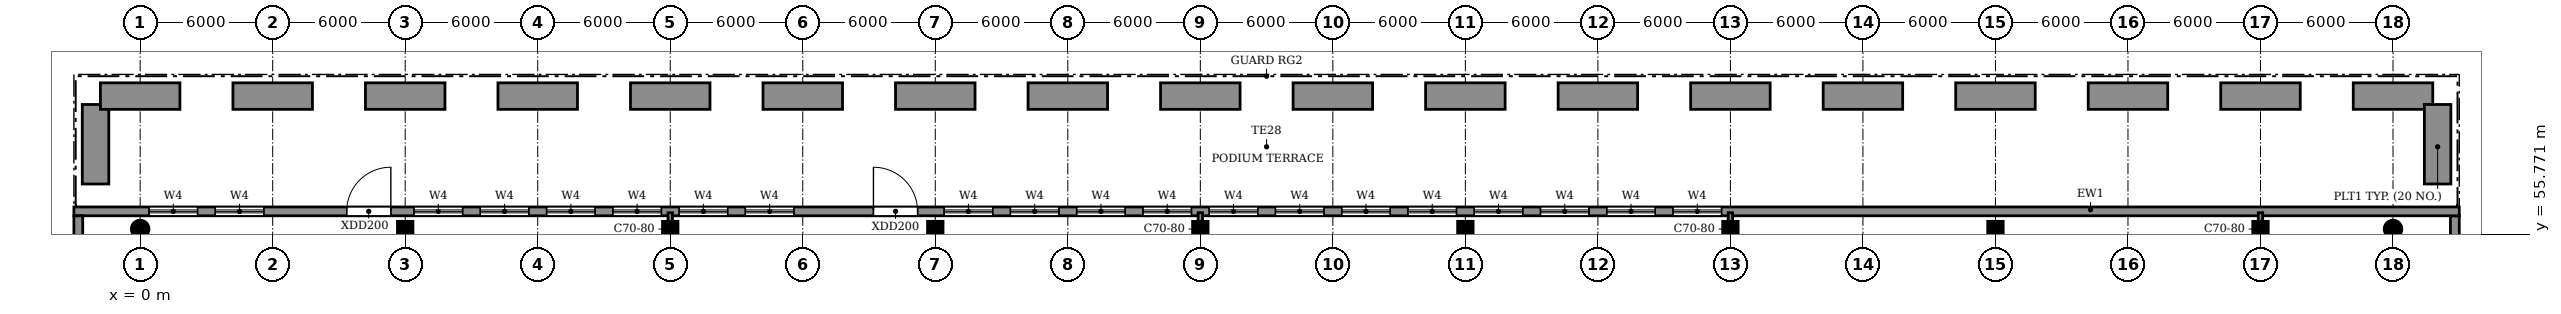
"""IFC4 building model, lengths in metres.
Left out: names, types, materials, properties, quantities, classifications, styles, units other than length and angle.
Written with IfcOpenShell. Run it as: python <this file> out.ifc"""

import sys

from ifc_helpers import new_model, si_unit, direction, frame, frame_2d, origin, origin_2d, place, context, subcontext, project, spatial, polyline, rectangle, circle, outline, extrude, source, transform, mapped, element, fill, save


model = new_model("IFC4")
c1 = context("Model", 3, precision=1e-05, world=origin(), true_north=direction((0.0, 1.0)))
c2 = subcontext(c1, "Body", "Model", "MODEL_VIEW")
j1 = project(units=[si_unit("LENGTHUNIT", "METRE"), si_unit("PLANEANGLEUNIT", "RADIAN")], contexts=[c1])
p1 = place(None, origin())
s1 = spatial("IfcSite", under=j1, at=p1, CompositionType="ELEMENT")
p2 = place(p1, origin())
s2 = spatial("IfcBuilding", under=s1, at=p2, CompositionType="ELEMENT")
p3 = place(p2, frame((0.0, 0.0, 15.0)))
s3 = spatial("IfcBuildingStorey", under=s2, at=p3, CompositionType="ELEMENT", Elevation=15.0)
m1 = source(origin(), c2, "Body", "SweptSolid", [
    extrude(circle(Radius=0.4, at=origin_2d()), origin(), (0.0, 0.0, 1.0), 3.92),
])
p4 = place(p3, frame((0.0, 56.0, 0.0), z_axis=(0.0, 0.0, 1.0), x_axis=(1.0, 0.0, 0.0)))
e1 = element("IfcColumn", 1, at=p4, inside=s3, PredefinedType="COLUMN", context=c2, shape_type="MappedRepresentation", body=[
    mapped(m1, transform((0.0, 0.0, 0.0))),
])
m2 = source(origin(), c2, "Body", "SweptSolid", [
    extrude(rectangle(XDim=0.7, YDim=0.7, at=origin_2d()), origin(), (0.0, 0.0, 1.0), 3.92),
])
for number, where, z_axis, x_axis in (
    (2, (12.0, 56.0, 0.0), (0.0, 0.0, 1.0), (1.0, 0.0, 0.0)),
    (3, (24.0, 56.0, 0.0), (0.0, 0.0, 1.0), (1.0, 0.0, 0.0)),
    (4, (36.0, 56.0, 0.0), (0.0, 0.0, 1.0), (1.0, 0.0, 0.0)),
    (5, (48.0, 56.0, 0.0), (0.0, 0.0, 1.0), (1.0, 0.0, 0.0)),
    (6, (60.0, 56.0, 0.0), (0.0, 0.0, 1.0), (1.0, 0.0, 0.0)),
    (7, (72.0, 56.0, 0.0), (0.0, 0.0, 1.0), (1.0, 0.0, 0.0)),
    (8, (84.0, 56.0, 0.0), (0.0, 0.0, 1.0), (1.0, 0.0, 0.0)),
    (9, (96.0, 56.0, 0.0), (0.0, 0.0, 1.0), (1.0, 0.0, 0.0)),
):
    element("IfcColumn", number, at=place(p3, frame(where, z_axis=z_axis, x_axis=x_axis)), inside=s3, PredefinedType="COLUMN", context=c2, shape_type="MappedRepresentation", body=[
        mapped(m2, transform((0.0, 0.0, 0.0))),
    ])
p5 = place(p3, frame((102.0, 56.0, 0.0), z_axis=(0.0, 0.0, 1.0), x_axis=(1.0, 0.0, 0.0)))
e10 = element("IfcColumn", 10, at=p5, inside=s3, PredefinedType="COLUMN", context=c2, shape_type="MappedRepresentation", body=[
    mapped(m1, transform((0.0, 0.0, 0.0))),
])
p6 = place(p3, frame((104.8, 0.2, 0.0), z_axis=(0.0, 0.0, 1.0), x_axis=(0.0, 1.0, 0.0)))
e11 = element("IfcWall", 11, at=p6, inside=s3, PredefinedType="STANDARD", context=c2, shape_type="SweptSolid", body=[
    extrude(rectangle(XDim=56.4, YDim=0.4, at=frame_2d((28.2, 0.0))), origin(), (0.0, 0.0, 1.0), 3.92),
])
p7 = place(p3, frame((105.0, 56.8, 0.0), z_axis=(0.0, 0.0, 1.0), x_axis=(-1.0, 0.0, 0.0)))
e12 = element("IfcWall", 12, at=p7, inside=s3, PredefinedType="STANDARD", context=c2, shape_type="SweptSolid", body=[
    extrude(rectangle(XDim=108.0, YDim=0.4, at=frame_2d((54.0, 0.0))), origin(), (0.0, 0.0, 1.0), 3.92),
])
p8 = place(p7, frame((102.4, 0.0, 0.9)))
e13 = element("IfcOpeningElement", 13, at=p8, cuts=e12, PredefinedType="OPENING", context=c2, shape_type="SweptSolid", body=[
    extrude(rectangle(XDim=2.2, YDim=2.7, at=frame_2d((1.1, 1.35))), frame((0.0, 0.21, 0.0), z_axis=(0.0, -1.0, 0.0), x_axis=(1.0, 0.0, 0.0)), (0.0, 0.0, 1.0), 0.42),
])
p9 = place(p7, frame((99.4, 0.0, 0.9)))
e14 = element("IfcOpeningElement", 14, at=p9, cuts=e12, PredefinedType="OPENING", context=c2, shape_type="SweptSolid", body=[
    extrude(rectangle(XDim=2.2, YDim=2.7, at=frame_2d((1.1, 1.35))), frame((0.0, 0.21, 0.0), z_axis=(0.0, -1.0, 0.0), x_axis=(1.0, 0.0, 0.0)), (0.0, 0.0, 1.0), 0.42),
])
p10 = place(p7, frame((90.4, 0.0, 0.9)))
e15 = element("IfcOpeningElement", 15, at=p10, cuts=e12, PredefinedType="OPENING", context=c2, shape_type="SweptSolid", body=[
    extrude(rectangle(XDim=2.2, YDim=2.7, at=frame_2d((1.1, 1.35))), frame((0.0, 0.21, 0.0), z_axis=(0.0, -1.0, 0.0), x_axis=(1.0, 0.0, 0.0)), (0.0, 0.0, 1.0), 0.42),
])
p11 = place(p7, frame((87.4, 0.0, 0.9)))
e16 = element("IfcOpeningElement", 16, at=p11, cuts=e12, PredefinedType="OPENING", context=c2, shape_type="SweptSolid", body=[
    extrude(rectangle(XDim=2.2, YDim=2.7, at=frame_2d((1.1, 1.35))), frame((0.0, 0.21, 0.0), z_axis=(0.0, -1.0, 0.0), x_axis=(1.0, 0.0, 0.0)), (0.0, 0.0, 1.0), 0.42),
])
p12 = place(p7, frame((84.4, 0.0, 0.9)))
e17 = element("IfcOpeningElement", 17, at=p12, cuts=e12, PredefinedType="OPENING", context=c2, shape_type="SweptSolid", body=[
    extrude(rectangle(XDim=2.2, YDim=2.7, at=frame_2d((1.1, 1.35))), frame((0.0, 0.21, 0.0), z_axis=(0.0, -1.0, 0.0), x_axis=(1.0, 0.0, 0.0)), (0.0, 0.0, 1.0), 0.42),
])
p13 = place(p7, frame((81.4, 0.0, 0.9)))
e18 = element("IfcOpeningElement", 18, at=p13, cuts=e12, PredefinedType="OPENING", context=c2, shape_type="SweptSolid", body=[
    extrude(rectangle(XDim=2.2, YDim=2.7, at=frame_2d((1.1, 1.35))), frame((0.0, 0.21, 0.0), z_axis=(0.0, -1.0, 0.0), x_axis=(1.0, 0.0, 0.0)), (0.0, 0.0, 1.0), 0.42),
])
p14 = place(p7, frame((78.4, 0.0, 0.9)))
e19 = element("IfcOpeningElement", 19, at=p14, cuts=e12, PredefinedType="OPENING", context=c2, shape_type="SweptSolid", body=[
    extrude(rectangle(XDim=2.2, YDim=2.7, at=frame_2d((1.1, 1.35))), frame((0.0, 0.21, 0.0), z_axis=(0.0, -1.0, 0.0), x_axis=(1.0, 0.0, 0.0)), (0.0, 0.0, 1.0), 0.42),
])
p15 = place(p7, frame((75.4, 0.0, 0.9)))
e20 = element("IfcOpeningElement", 20, at=p15, cuts=e12, PredefinedType="OPENING", context=c2, shape_type="SweptSolid", body=[
    extrude(rectangle(XDim=2.2, YDim=2.7, at=frame_2d((1.1, 1.35))), frame((0.0, 0.21, 0.0), z_axis=(0.0, -1.0, 0.0), x_axis=(1.0, 0.0, 0.0)), (0.0, 0.0, 1.0), 0.42),
])
p16 = place(p7, frame((66.4, 0.0, 0.9)))
e21 = element("IfcOpeningElement", 21, at=p16, cuts=e12, PredefinedType="OPENING", context=c2, shape_type="SweptSolid", body=[
    extrude(rectangle(XDim=2.2, YDim=2.7, at=frame_2d((1.1, 1.35))), frame((0.0, 0.21, 0.0), z_axis=(0.0, -1.0, 0.0), x_axis=(1.0, 0.0, 0.0)), (0.0, 0.0, 1.0), 0.42),
])
p17 = place(p7, frame((63.4, 0.0, 0.9)))
e22 = element("IfcOpeningElement", 22, at=p17, cuts=e12, PredefinedType="OPENING", context=c2, shape_type="SweptSolid", body=[
    extrude(rectangle(XDim=2.2, YDim=2.7, at=frame_2d((1.1, 1.35))), frame((0.0, 0.21, 0.0), z_axis=(0.0, -1.0, 0.0), x_axis=(1.0, 0.0, 0.0)), (0.0, 0.0, 1.0), 0.42),
])
p18 = place(p7, frame((60.4, 0.0, 0.9)))
e23 = element("IfcOpeningElement", 23, at=p18, cuts=e12, PredefinedType="OPENING", context=c2, shape_type="SweptSolid", body=[
    extrude(rectangle(XDim=2.2, YDim=2.7, at=frame_2d((1.1, 1.35))), frame((0.0, 0.21, 0.0), z_axis=(0.0, -1.0, 0.0), x_axis=(1.0, 0.0, 0.0)), (0.0, 0.0, 1.0), 0.42),
])
p19 = place(p7, frame((57.4, 0.0, 0.9)))
e24 = element("IfcOpeningElement", 24, at=p19, cuts=e12, PredefinedType="OPENING", context=c2, shape_type="SweptSolid", body=[
    extrude(rectangle(XDim=2.2, YDim=2.7, at=frame_2d((1.1, 1.35))), frame((0.0, 0.21, 0.0), z_axis=(0.0, -1.0, 0.0), x_axis=(1.0, 0.0, 0.0)), (0.0, 0.0, 1.0), 0.42),
])
p20 = place(p7, frame((54.4, 0.0, 0.9)))
e25 = element("IfcOpeningElement", 25, at=p20, cuts=e12, PredefinedType="OPENING", context=c2, shape_type="SweptSolid", body=[
    extrude(rectangle(XDim=2.2, YDim=2.7, at=frame_2d((1.1, 1.35))), frame((0.0, 0.21, 0.0), z_axis=(0.0, -1.0, 0.0), x_axis=(1.0, 0.0, 0.0)), (0.0, 0.0, 1.0), 0.42),
])
p21 = place(p7, frame((51.4, 0.0, 0.9)))
e26 = element("IfcOpeningElement", 26, at=p21, cuts=e12, PredefinedType="OPENING", context=c2, shape_type="SweptSolid", body=[
    extrude(rectangle(XDim=2.2, YDim=2.7, at=frame_2d((1.1, 1.35))), frame((0.0, 0.21, 0.0), z_axis=(0.0, -1.0, 0.0), x_axis=(1.0, 0.0, 0.0)), (0.0, 0.0, 1.0), 0.42),
])
p22 = place(p7, frame((48.4, 0.0, 0.9)))
e27 = element("IfcOpeningElement", 27, at=p22, cuts=e12, PredefinedType="OPENING", context=c2, shape_type="SweptSolid", body=[
    extrude(rectangle(XDim=2.2, YDim=2.7, at=frame_2d((1.1, 1.35))), frame((0.0, 0.21, 0.0), z_axis=(0.0, -1.0, 0.0), x_axis=(1.0, 0.0, 0.0)), (0.0, 0.0, 1.0), 0.42),
])
p23 = place(p7, frame((45.4, 0.0, 0.9)))
e28 = element("IfcOpeningElement", 28, at=p23, cuts=e12, PredefinedType="OPENING", context=c2, shape_type="SweptSolid", body=[
    extrude(rectangle(XDim=2.2, YDim=2.7, at=frame_2d((1.1, 1.35))), frame((0.0, 0.21, 0.0), z_axis=(0.0, -1.0, 0.0), x_axis=(1.0, 0.0, 0.0)), (0.0, 0.0, 1.0), 0.42),
])
p24 = place(p7, frame((42.4, 0.0, 0.9)))
e29 = element("IfcOpeningElement", 29, at=p24, cuts=e12, PredefinedType="OPENING", context=c2, shape_type="SweptSolid", body=[
    extrude(rectangle(XDim=2.2, YDim=2.7, at=frame_2d((1.1, 1.35))), frame((0.0, 0.21, 0.0), z_axis=(0.0, -1.0, 0.0), x_axis=(1.0, 0.0, 0.0)), (0.0, 0.0, 1.0), 0.42),
])
p25 = place(p7, frame((39.4, 0.0, 0.9)))
e30 = element("IfcOpeningElement", 30, at=p25, cuts=e12, PredefinedType="OPENING", context=c2, shape_type="SweptSolid", body=[
    extrude(rectangle(XDim=2.2, YDim=2.7, at=frame_2d((1.1, 1.35))), frame((0.0, 0.21, 0.0), z_axis=(0.0, -1.0, 0.0), x_axis=(1.0, 0.0, 0.0)), (0.0, 0.0, 1.0), 0.42),
])
p26 = place(p7, frame((36.4, 0.0, 0.9)))
e31 = element("IfcOpeningElement", 31, at=p26, cuts=e12, PredefinedType="OPENING", context=c2, shape_type="SweptSolid", body=[
    extrude(rectangle(XDim=2.2, YDim=2.7, at=frame_2d((1.1, 1.35))), frame((0.0, 0.21, 0.0), z_axis=(0.0, -1.0, 0.0), x_axis=(1.0, 0.0, 0.0)), (0.0, 0.0, 1.0), 0.42),
])
p27 = place(p7, frame((33.4, 0.0, 0.9)))
e32 = element("IfcOpeningElement", 32, at=p27, cuts=e12, PredefinedType="OPENING", context=c2, shape_type="SweptSolid", body=[
    extrude(rectangle(XDim=2.2, YDim=2.7, at=frame_2d((1.1, 1.35))), frame((0.0, 0.21, 0.0), z_axis=(0.0, -1.0, 0.0), x_axis=(1.0, 0.0, 0.0)), (0.0, 0.0, 1.0), 0.42),
])
p28 = place(p7, frame((93.65, 0.0, 0.0)))
e33 = element("IfcOpeningElement", 33, at=p28, cuts=e12, PredefinedType="OPENING", context=c2, shape_type="SweptSolid", body=[
    extrude(rectangle(XDim=2.0, YDim=2.4, at=frame_2d((1.0, 1.2))), frame((0.0, 0.21, 0.0), z_axis=(0.0, -1.0, 0.0), x_axis=(1.0, 0.0, 0.0)), (0.0, 0.0, 1.0), 0.42),
])
p29 = place(p7, frame((69.8, 0.0, 0.0)))
e34 = element("IfcOpeningElement", 34, at=p29, cuts=e12, PredefinedType="OPENING", context=c2, shape_type="SweptSolid", body=[
    extrude(rectangle(XDim=2.0, YDim=2.4, at=frame_2d((1.0, 1.2))), frame((0.0, 0.21, 0.0), z_axis=(0.0, -1.0, 0.0), x_axis=(1.0, 0.0, 0.0)), (0.0, 0.0, 1.0), 0.42),
])
p30 = place(p3, frame((-2.8, 56.6, 0.0), z_axis=(0.0, 0.0, 1.0), x_axis=(0.0, -1.0, 0.0)))
e35 = element("IfcWall", 35, at=p30, inside=s3, PredefinedType="STANDARD", context=c2, shape_type="SweptSolid", body=[
    extrude(rectangle(XDim=56.4, YDim=0.4, at=frame_2d((28.2, 0.0))), origin(), (0.0, 0.0, 1.0), 3.92),
])
m3 = source(origin(), c2, "Body", "SweptSolid", [
    extrude(outline(polyline([(0.0, 0.0), (1.2, 0.0), (1.2, 3.6), (0.0, 3.6), (0.0, 0.0)])), origin(), (0.0, 0.0, 1.0), 0.6),
])
p31 = place(p3, frame((-2.62, 58.04, 0.0)))
e36 = element("IfcWall", 36, at=p31, inside=s3, PredefinedType="USERDEFINED", context=c2, shape_type="MappedRepresentation", body=[
    mapped(m3, transform((0.0, 0.0, 0.0))),
])
m4 = source(origin(), c2, "Body", "SweptSolid", [
    extrude(outline(polyline([(0.0, 0.0), (3.6, 0.0), (3.6, 1.2), (0.0, 1.2), (0.0, 0.0)])), origin(), (0.0, 0.0, 1.0), 0.6),
])
for number, where in (
    (37, (-1.8, 61.42, 0.0)),
    (38, (4.2, 61.42, 0.0)),
    (39, (10.2, 61.42, 0.0)),
    (40, (16.2, 61.42, 0.0)),
    (41, (22.2, 61.42, 0.0)),
    (42, (28.2, 61.42, 0.0)),
    (43, (34.2, 61.42, 0.0)),
    (44, (40.2, 61.42, 0.0)),
    (45, (46.2, 61.42, 0.0)),
    (46, (52.2, 61.42, 0.0)),
    (47, (58.2, 61.42, 0.0)),
    (48, (64.2, 61.42, 0.0)),
    (49, (70.2, 61.42, 0.0)),
    (50, (76.2, 61.42, 0.0)),
    (51, (82.2, 61.42, 0.0)),
    (52, (88.2, 61.42, 0.0)),
    (53, (94.2, 61.42, 0.0)),
    (54, (100.2, 61.42, 0.0)),
):
    element("IfcWall", number, at=place(p3, frame(where)), inside=s3, PredefinedType="USERDEFINED", context=c2, shape_type="MappedRepresentation", body=[
        mapped(m4, transform((0.0, 0.0, 0.0))),
    ])
p32 = place(p3, frame((103.42, 58.04, 0.0)))
e55 = element("IfcWall", 55, at=p32, inside=s3, PredefinedType="USERDEFINED", context=c2, shape_type="MappedRepresentation", body=[
    mapped(m3, transform((0.0, 0.0, 0.0))),
])
for number, where, z_axis, x_axis in (
    (56, (24.0, 44.9, 0.0), (0.0, 0.0, 1.0), (0.0, 1.0, 0.0)),
    (57, (48.0, 44.9, 0.0), (0.0, 0.0, 1.0), (0.0, 1.0, 0.0)),
    (58, (72.0, 44.9, 0.0), (0.0, 0.0, 1.0), (0.0, 1.0, 0.0)),
    (59, (96.0, 44.9, 0.0), (0.0, 0.0, 1.0), (0.0, 1.0, 0.0)),
):
    element("IfcWall", number, at=place(p3, frame(where, z_axis=z_axis, x_axis=x_axis)), inside=s3, PredefinedType="PARTITIONING", context=c2, shape_type="SweptSolid", body=[
        extrude(rectangle(XDim=11.84, YDim=0.2, at=frame_2d((5.92, 0.0))), origin(), (0.0, 0.0, 1.0), 3.92),
    ])
p33 = place(p8, origin())
e60 = element("IfcWindow", 60, at=p33, inside=s3, PartitioningType="DOUBLE_PANEL_HORIZONTAL", PredefinedType="WINDOW", context=c2, shape_type="SweptSolid", body=[
    extrude(rectangle(XDim=2.2, YDim=2.7, at=frame_2d((1.1, 1.35))), frame((0.0, 0.03, 0.0), z_axis=(0.0, -1.0, 0.0), x_axis=(1.0, 0.0, 0.0)), (0.0, 0.0, 1.0), 0.06),
])
fill(e13, e60)
p34 = place(p9, origin())
e61 = element("IfcWindow", 61, at=p34, inside=s3, PartitioningType="DOUBLE_PANEL_HORIZONTAL", PredefinedType="WINDOW", context=c2, shape_type="SweptSolid", body=[
    extrude(rectangle(XDim=2.2, YDim=2.7, at=frame_2d((1.1, 1.35))), frame((0.0, 0.03, 0.0), z_axis=(0.0, -1.0, 0.0), x_axis=(1.0, 0.0, 0.0)), (0.0, 0.0, 1.0), 0.06),
])
fill(e14, e61)
p35 = place(p10, origin())
e62 = element("IfcWindow", 62, at=p35, inside=s3, PartitioningType="DOUBLE_PANEL_HORIZONTAL", PredefinedType="WINDOW", context=c2, shape_type="SweptSolid", body=[
    extrude(rectangle(XDim=2.2, YDim=2.7, at=frame_2d((1.1, 1.35))), frame((0.0, 0.03, 0.0), z_axis=(0.0, -1.0, 0.0), x_axis=(1.0, 0.0, 0.0)), (0.0, 0.0, 1.0), 0.06),
])
fill(e15, e62)
p36 = place(p11, origin())
e63 = element("IfcWindow", 63, at=p36, inside=s3, PartitioningType="DOUBLE_PANEL_HORIZONTAL", PredefinedType="WINDOW", context=c2, shape_type="SweptSolid", body=[
    extrude(rectangle(XDim=2.2, YDim=2.7, at=frame_2d((1.1, 1.35))), frame((0.0, 0.03, 0.0), z_axis=(0.0, -1.0, 0.0), x_axis=(1.0, 0.0, 0.0)), (0.0, 0.0, 1.0), 0.06),
])
fill(e16, e63)
p37 = place(p12, origin())
e64 = element("IfcWindow", 64, at=p37, inside=s3, PartitioningType="DOUBLE_PANEL_HORIZONTAL", PredefinedType="WINDOW", context=c2, shape_type="SweptSolid", body=[
    extrude(rectangle(XDim=2.2, YDim=2.7, at=frame_2d((1.1, 1.35))), frame((0.0, 0.03, 0.0), z_axis=(0.0, -1.0, 0.0), x_axis=(1.0, 0.0, 0.0)), (0.0, 0.0, 1.0), 0.06),
])
fill(e17, e64)
p38 = place(p13, origin())
e65 = element("IfcWindow", 65, at=p38, inside=s3, PartitioningType="DOUBLE_PANEL_HORIZONTAL", PredefinedType="WINDOW", context=c2, shape_type="SweptSolid", body=[
    extrude(rectangle(XDim=2.2, YDim=2.7, at=frame_2d((1.1, 1.35))), frame((0.0, 0.03, 0.0), z_axis=(0.0, -1.0, 0.0), x_axis=(1.0, 0.0, 0.0)), (0.0, 0.0, 1.0), 0.06),
])
fill(e18, e65)
p39 = place(p14, origin())
e66 = element("IfcWindow", 66, at=p39, inside=s3, PartitioningType="DOUBLE_PANEL_HORIZONTAL", PredefinedType="WINDOW", context=c2, shape_type="SweptSolid", body=[
    extrude(rectangle(XDim=2.2, YDim=2.7, at=frame_2d((1.1, 1.35))), frame((0.0, 0.03, 0.0), z_axis=(0.0, -1.0, 0.0), x_axis=(1.0, 0.0, 0.0)), (0.0, 0.0, 1.0), 0.06),
])
fill(e19, e66)
p40 = place(p15, origin())
e67 = element("IfcWindow", 67, at=p40, inside=s3, PartitioningType="DOUBLE_PANEL_HORIZONTAL", PredefinedType="WINDOW", context=c2, shape_type="SweptSolid", body=[
    extrude(rectangle(XDim=2.2, YDim=2.7, at=frame_2d((1.1, 1.35))), frame((0.0, 0.03, 0.0), z_axis=(0.0, -1.0, 0.0), x_axis=(1.0, 0.0, 0.0)), (0.0, 0.0, 1.0), 0.06),
])
fill(e20, e67)
p41 = place(p16, origin())
e68 = element("IfcWindow", 68, at=p41, inside=s3, PartitioningType="DOUBLE_PANEL_HORIZONTAL", PredefinedType="WINDOW", context=c2, shape_type="SweptSolid", body=[
    extrude(rectangle(XDim=2.2, YDim=2.7, at=frame_2d((1.1, 1.35))), frame((0.0, 0.03, 0.0), z_axis=(0.0, -1.0, 0.0), x_axis=(1.0, 0.0, 0.0)), (0.0, 0.0, 1.0), 0.06),
])
fill(e21, e68)
p42 = place(p17, origin())
e69 = element("IfcWindow", 69, at=p42, inside=s3, PartitioningType="DOUBLE_PANEL_HORIZONTAL", PredefinedType="WINDOW", context=c2, shape_type="SweptSolid", body=[
    extrude(rectangle(XDim=2.2, YDim=2.7, at=frame_2d((1.1, 1.35))), frame((0.0, 0.03, 0.0), z_axis=(0.0, -1.0, 0.0), x_axis=(1.0, 0.0, 0.0)), (0.0, 0.0, 1.0), 0.06),
])
fill(e22, e69)
p43 = place(p18, origin())
e70 = element("IfcWindow", 70, at=p43, inside=s3, PartitioningType="DOUBLE_PANEL_HORIZONTAL", PredefinedType="WINDOW", context=c2, shape_type="SweptSolid", body=[
    extrude(rectangle(XDim=2.2, YDim=2.7, at=frame_2d((1.1, 1.35))), frame((0.0, 0.03, 0.0), z_axis=(0.0, -1.0, 0.0), x_axis=(1.0, 0.0, 0.0)), (0.0, 0.0, 1.0), 0.06),
])
fill(e23, e70)
p44 = place(p19, origin())
e71 = element("IfcWindow", 71, at=p44, inside=s3, PartitioningType="DOUBLE_PANEL_HORIZONTAL", PredefinedType="WINDOW", context=c2, shape_type="SweptSolid", body=[
    extrude(rectangle(XDim=2.2, YDim=2.7, at=frame_2d((1.1, 1.35))), frame((0.0, 0.03, 0.0), z_axis=(0.0, -1.0, 0.0), x_axis=(1.0, 0.0, 0.0)), (0.0, 0.0, 1.0), 0.06),
])
fill(e24, e71)
p45 = place(p20, origin())
e72 = element("IfcWindow", 72, at=p45, inside=s3, PartitioningType="DOUBLE_PANEL_HORIZONTAL", PredefinedType="WINDOW", context=c2, shape_type="SweptSolid", body=[
    extrude(rectangle(XDim=2.2, YDim=2.7, at=frame_2d((1.1, 1.35))), frame((0.0, 0.03, 0.0), z_axis=(0.0, -1.0, 0.0), x_axis=(1.0, 0.0, 0.0)), (0.0, 0.0, 1.0), 0.06),
])
fill(e25, e72)
p46 = place(p21, origin())
e73 = element("IfcWindow", 73, at=p46, inside=s3, PartitioningType="DOUBLE_PANEL_HORIZONTAL", PredefinedType="WINDOW", context=c2, shape_type="SweptSolid", body=[
    extrude(rectangle(XDim=2.2, YDim=2.7, at=frame_2d((1.1, 1.35))), frame((0.0, 0.03, 0.0), z_axis=(0.0, -1.0, 0.0), x_axis=(1.0, 0.0, 0.0)), (0.0, 0.0, 1.0), 0.06),
])
fill(e26, e73)
p47 = place(p22, origin())
e74 = element("IfcWindow", 74, at=p47, inside=s3, PartitioningType="DOUBLE_PANEL_HORIZONTAL", PredefinedType="WINDOW", context=c2, shape_type="SweptSolid", body=[
    extrude(rectangle(XDim=2.2, YDim=2.7, at=frame_2d((1.1, 1.35))), frame((0.0, 0.03, 0.0), z_axis=(0.0, -1.0, 0.0), x_axis=(1.0, 0.0, 0.0)), (0.0, 0.0, 1.0), 0.06),
])
fill(e27, e74)
p48 = place(p23, origin())
e75 = element("IfcWindow", 75, at=p48, inside=s3, PartitioningType="DOUBLE_PANEL_HORIZONTAL", PredefinedType="WINDOW", context=c2, shape_type="SweptSolid", body=[
    extrude(rectangle(XDim=2.2, YDim=2.7, at=frame_2d((1.1, 1.35))), frame((0.0, 0.03, 0.0), z_axis=(0.0, -1.0, 0.0), x_axis=(1.0, 0.0, 0.0)), (0.0, 0.0, 1.0), 0.06),
])
fill(e28, e75)
p49 = place(p24, origin())
e76 = element("IfcWindow", 76, at=p49, inside=s3, PartitioningType="DOUBLE_PANEL_HORIZONTAL", PredefinedType="WINDOW", context=c2, shape_type="SweptSolid", body=[
    extrude(rectangle(XDim=2.2, YDim=2.7, at=frame_2d((1.1, 1.35))), frame((0.0, 0.03, 0.0), z_axis=(0.0, -1.0, 0.0), x_axis=(1.0, 0.0, 0.0)), (0.0, 0.0, 1.0), 0.06),
])
fill(e29, e76)
p50 = place(p25, origin())
e77 = element("IfcWindow", 77, at=p50, inside=s3, PartitioningType="DOUBLE_PANEL_HORIZONTAL", PredefinedType="WINDOW", context=c2, shape_type="SweptSolid", body=[
    extrude(rectangle(XDim=2.2, YDim=2.7, at=frame_2d((1.1, 1.35))), frame((0.0, 0.03, 0.0), z_axis=(0.0, -1.0, 0.0), x_axis=(1.0, 0.0, 0.0)), (0.0, 0.0, 1.0), 0.06),
])
fill(e30, e77)
p51 = place(p26, origin())
e78 = element("IfcWindow", 78, at=p51, inside=s3, PartitioningType="DOUBLE_PANEL_HORIZONTAL", PredefinedType="WINDOW", context=c2, shape_type="SweptSolid", body=[
    extrude(rectangle(XDim=2.2, YDim=2.7, at=frame_2d((1.1, 1.35))), frame((0.0, 0.03, 0.0), z_axis=(0.0, -1.0, 0.0), x_axis=(1.0, 0.0, 0.0)), (0.0, 0.0, 1.0), 0.06),
])
fill(e31, e78)
p52 = place(p27, origin())
e79 = element("IfcWindow", 79, at=p52, inside=s3, PartitioningType="DOUBLE_PANEL_HORIZONTAL", PredefinedType="WINDOW", context=c2, shape_type="SweptSolid", body=[
    extrude(rectangle(XDim=2.2, YDim=2.7, at=frame_2d((1.1, 1.35))), frame((0.0, 0.03, 0.0), z_axis=(0.0, -1.0, 0.0), x_axis=(1.0, 0.0, 0.0)), (0.0, 0.0, 1.0), 0.06),
])
fill(e32, e79)
p53 = place(p28, frame((2.0, 0.0, 0.0), z_axis=(0.0, 0.0, 1.0), x_axis=(-1.0, 0.0, 0.0)))
e80 = element("IfcDoor", 80, at=p53, inside=s3, OperationType="DOUBLE_DOOR_SINGLE_SWING", PredefinedType="DOOR", context=c2, shape_type="SweptSolid", body=[
    extrude(rectangle(XDim=2.0, YDim=2.4, at=frame_2d((1.0, 1.2))), frame((0.0, 0.025, 0.0), z_axis=(0.0, -1.0, 0.0), x_axis=(1.0, 0.0, 0.0)), (0.0, 0.0, 1.0), 0.05),
])
fill(e33, e80)
p54 = place(p29, frame((2.0, 0.0, 0.0), z_axis=(0.0, 0.0, 1.0), x_axis=(-1.0, 0.0, 0.0)))
e81 = element("IfcDoor", 81, at=p54, inside=s3, OperationType="DOUBLE_DOOR_SINGLE_SWING", PredefinedType="DOOR", context=c2, shape_type="SweptSolid", body=[
    extrude(rectangle(XDim=2.0, YDim=2.4, at=frame_2d((1.0, 1.2))), frame((0.0, 0.025, 0.0), z_axis=(0.0, -1.0, 0.0), x_axis=(1.0, 0.0, 0.0)), (0.0, 0.0, 1.0), 0.05),
])
fill(e34, e81)
save(model, sys.argv[1])
